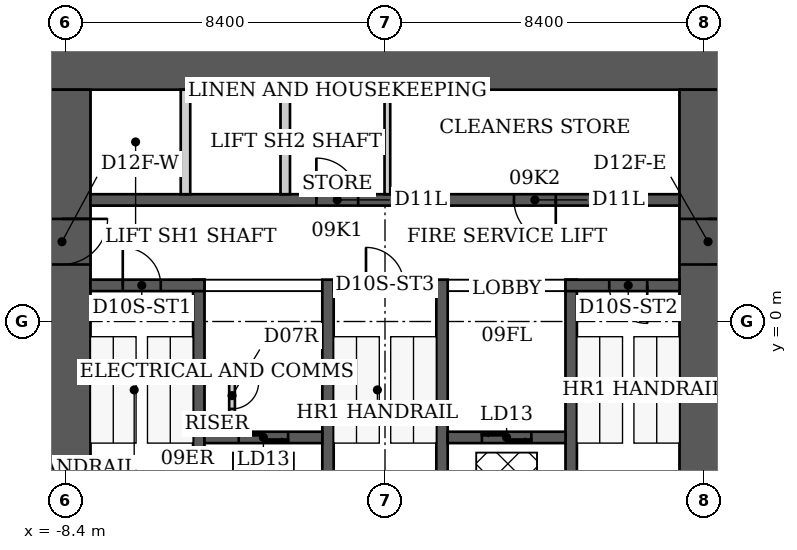
"""IFC4 building model, lengths in metres.
Left out: names, types, materials, properties, quantities, classifications, styles, units other than length and angle.
Written with IfcOpenShell. Run it as: python <this file> out.ifc"""

import sys

from ifc_helpers import new_model, si_unit, direction, frame, frame_2d, origin, place, context, subcontext, project, spatial, rectangle, extrude, element, fill, save


model = new_model("IFC4")
c1 = context("Model", 3, precision=1e-05, world=origin(), true_north=direction((0.0, 1.0)))
c2 = subcontext(c1, "Body", "Model", "MODEL_VIEW")
j1 = project(units=[si_unit("LENGTHUNIT", "METRE"), si_unit("PLANEANGLEUNIT", "RADIAN")], contexts=[c1])
p1 = place(None, origin())
s1 = spatial("IfcSite", under=j1, at=p1, CompositionType="ELEMENT")
p2 = place(p1, origin())
s2 = spatial("IfcBuilding", under=s1, at=p2, CompositionType="ELEMENT")
p3 = place(p2, frame((0.0, 0.0, 42.0)))
s3 = spatial("IfcBuildingStorey", under=s2, at=p3, CompositionType="ELEMENT", Elevation=42.0)
p4 = place(p3, frame((-9.25, 6.85, 0.0), z_axis=(0.0, 0.0, 1.0), x_axis=(1.0, 0.0, 0.0)))
e1 = element("IfcWall", 1, at=p4, inside=s3, PredefinedType="SHEAR", context=c2, shape_type="SweptSolid", body=[
    extrude(rectangle(XDim=18.5, YDim=1.5, at=frame_2d((9.25, 0.0))), origin(), (0.0, 0.0, 1.0), 3.8),
])
p5 = place(p3, frame((-8.5, -9.2, 0.0), z_axis=(0.0, 0.0, 1.0), x_axis=(0.0, 1.0, 0.0)))
e2 = element("IfcWall", 2, at=p5, inside=s3, PredefinedType="SHEAR", context=c2, shape_type="SweptSolid", body=[
    extrude(rectangle(XDim=15.3, YDim=1.5, at=frame_2d((7.65, 0.0))), origin(), (0.0, 0.0, 1.0), 3.8),
])
p6 = place(p5, frame((10.7, 0.0, 0.0)))
e3 = element("IfcOpeningElement", 3, at=p6, cuts=e2, PredefinedType="OPENING", context=c2, shape_type="SweptSolid", body=[
    extrude(rectangle(XDim=1.2, YDim=2.2, at=frame_2d((0.6, 1.1))), frame((0.0, 0.75, 0.0), z_axis=(0.0, -1.0, 0.0), x_axis=(1.0, 0.0, 0.0)), (0.0, 0.0, 1.0), 1.5),
])
p7 = place(p3, frame((8.5, -9.2, 0.0), z_axis=(0.0, 0.0, 1.0), x_axis=(0.0, 1.0, 0.0)))
e4 = element("IfcWall", 4, at=p7, inside=s3, PredefinedType="SHEAR", context=c2, shape_type="SweptSolid", body=[
    extrude(rectangle(XDim=15.3, YDim=1.5, at=frame_2d((7.65, 0.0))), origin(), (0.0, 0.0, 1.0), 3.8),
])
p8 = place(p7, frame((10.7, 0.0, 0.0)))
e5 = element("IfcOpeningElement", 5, at=p8, cuts=e4, PredefinedType="OPENING", context=c2, shape_type="SweptSolid", body=[
    extrude(rectangle(XDim=1.2, YDim=2.2, at=frame_2d((0.6, 1.1))), frame((0.0, 0.75, 0.0), z_axis=(0.0, -1.0, 0.0), x_axis=(1.0, 0.0, 0.0)), (0.0, 0.0, 1.0), 1.5),
])
for number, where, z_axis, x_axis in (
    (6, (-4.9, -6.1, 0.0), (0.0, 0.0, 1.0), (0.0, 1.0, 0.0)),
    (7, (-1.5, -6.1, 0.0), (0.0, 0.0, 1.0), (0.0, 1.0, 0.0)),
    (8, (1.5, -6.1, 0.0), (0.0, 0.0, 1.0), (0.0, 1.0, 0.0)),
    (9, (4.9, -6.1, 0.0), (0.0, 0.0, 1.0), (0.0, 1.0, 0.0)),
):
    element("IfcWall", number, at=place(p3, frame(where, z_axis=z_axis, x_axis=x_axis)), inside=s3, PredefinedType="SHEAR", context=c2, shape_type="SweptSolid", body=[
        extrude(rectangle(XDim=7.2, YDim=0.3, at=frame_2d((3.6, 0.0))), origin(), (0.0, 0.0, 1.0), 3.8),
    ])
p9 = place(p3, frame((-7.75, 0.95, 0.0), z_axis=(0.0, 0.0, 1.0), x_axis=(1.0, 0.0, 0.0)))
e10 = element("IfcWall", 10, at=p9, inside=s3, PredefinedType="SHEAR", context=c2, shape_type="SweptSolid", body=[
    extrude(rectangle(XDim=3.0, YDim=0.3, at=frame_2d((1.5, 0.0))), origin(), (0.0, 0.0, 1.0), 3.8),
])
p10 = place(p9, frame((0.85, 0.0, 0.0)))
e11 = element("IfcOpeningElement", 11, at=p10, cuts=e10, PredefinedType="OPENING", context=c2, shape_type="SweptSolid", body=[
    extrude(rectangle(XDim=1.0, YDim=2.2, at=frame_2d((0.5, 1.1))), frame((0.0, 0.15, 0.0), z_axis=(0.0, -1.0, 0.0), x_axis=(1.0, 0.0, 0.0)), (0.0, 0.0, 1.0), 0.3),
])
p11 = place(p3, frame((-1.35, 0.95, 0.0), z_axis=(0.0, 0.0, 1.0), x_axis=(1.0, 0.0, 0.0)))
e12 = element("IfcWall", 12, at=p11, inside=s3, PredefinedType="SHEAR", context=c2, shape_type="SweptSolid", body=[
    extrude(rectangle(XDim=2.7, YDim=0.3, at=frame_2d((1.35, 0.0))), origin(), (0.0, 0.0, 1.0), 3.8),
])
p12 = place(p11, frame((0.85, 0.0, 0.0)))
e13 = element("IfcOpeningElement", 13, at=p12, cuts=e12, PredefinedType="OPENING", context=c2, shape_type="SweptSolid", body=[
    extrude(rectangle(XDim=1.0, YDim=2.2, at=frame_2d((0.5, 1.1))), frame((0.0, 0.15, 0.0), z_axis=(0.0, -1.0, 0.0), x_axis=(1.0, 0.0, 0.0)), (0.0, 0.0, 1.0), 0.3),
])
p13 = place(p3, frame((4.75, 0.95, 0.0), z_axis=(0.0, 0.0, 1.0), x_axis=(1.0, 0.0, 0.0)))
e14 = element("IfcWall", 14, at=p13, inside=s3, PredefinedType="SHEAR", context=c2, shape_type="SweptSolid", body=[
    extrude(rectangle(XDim=3.0, YDim=0.3, at=frame_2d((1.5, 0.0))), origin(), (0.0, 0.0, 1.0), 3.8),
])
p14 = place(p13, frame((1.15, 0.0, 0.0)))
e15 = element("IfcOpeningElement", 15, at=p14, cuts=e14, PredefinedType="OPENING", context=c2, shape_type="SweptSolid", body=[
    extrude(rectangle(XDim=1.0, YDim=2.2, at=frame_2d((0.5, 1.1))), frame((0.0, 0.15, 0.0), z_axis=(0.0, -1.0, 0.0), x_axis=(1.0, 0.0, 0.0)), (0.0, 0.0, 1.0), 0.3),
])
p15 = place(p3, frame((-4.75, -3.05, 0.0), z_axis=(0.0, 0.0, 1.0), x_axis=(1.0, 0.0, 0.0)))
e16 = element("IfcWall", 16, at=p15, inside=s3, PredefinedType="SHEAR", context=c2, shape_type="SweptSolid", body=[
    extrude(rectangle(XDim=3.1, YDim=0.3, at=frame_2d((1.55, 0.0))), origin(), (0.0, 0.0, 1.0), 3.8),
])
p16 = place(p15, frame((0.9, 0.0, 0.0)))
e17 = element("IfcOpeningElement", 17, at=p16, cuts=e16, PredefinedType="OPENING", context=c2, shape_type="SweptSolid", body=[
    extrude(rectangle(XDim=1.3, YDim=2.1, at=frame_2d((0.65, 1.05))), frame((0.0, 0.15, 0.0), z_axis=(0.0, -1.0, 0.0), x_axis=(1.0, 0.0, 0.0)), (0.0, 0.0, 1.0), 0.3),
])
p17 = place(p3, frame((1.65, -3.05, 0.0), z_axis=(0.0, 0.0, 1.0), x_axis=(1.0, 0.0, 0.0)))
e18 = element("IfcWall", 18, at=p17, inside=s3, PredefinedType="SHEAR", context=c2, shape_type="SweptSolid", body=[
    extrude(rectangle(XDim=3.1, YDim=0.3, at=frame_2d((1.55, 0.0))), origin(), (0.0, 0.0, 1.0), 3.8),
])
p18 = place(p17, frame((0.9, 0.0, 0.0)))
e19 = element("IfcOpeningElement", 19, at=p18, cuts=e18, PredefinedType="OPENING", context=c2, shape_type="SweptSolid", body=[
    extrude(rectangle(XDim=1.3, YDim=2.1, at=frame_2d((0.65, 1.05))), frame((0.0, 0.15, 0.0), z_axis=(0.0, -1.0, 0.0), x_axis=(1.0, 0.0, 0.0)), (0.0, 0.0, 1.0), 0.3),
])
p19 = place(p3, frame((-7.75, 3.2, 0.0), z_axis=(0.0, 0.0, 1.0), x_axis=(1.0, 0.0, 0.0)))
e20 = element("IfcWall", 20, at=p19, inside=s3, PredefinedType="SHEAR", context=c2, shape_type="SweptSolid", body=[
    extrude(rectangle(XDim=15.5, YDim=0.3, at=frame_2d((7.75, 0.0))), origin(), (0.0, 0.0, 1.0), 3.8),
])
p20 = place(p19, frame((5.944, 0.0, 0.0)))
e21 = element("IfcOpeningElement", 21, at=p20, cuts=e20, PredefinedType="OPENING", context=c2, shape_type="SweptSolid", body=[
    extrude(rectangle(XDim=1.1, YDim=2.2, at=frame_2d((0.55, 1.1))), frame((0.0, 0.15, 0.0), z_axis=(0.0, -1.0, 0.0), x_axis=(1.0, 0.0, 0.0)), (0.0, 0.0, 1.0), 0.3),
])
p21 = place(p19, frame((11.144, 0.0, 0.0)))
e22 = element("IfcOpeningElement", 22, at=p21, cuts=e20, PredefinedType="OPENING", context=c2, shape_type="SweptSolid", body=[
    extrude(rectangle(XDim=1.1, YDim=2.2, at=frame_2d((0.55, 1.1))), frame((0.0, 0.15, 0.0), z_axis=(0.0, -1.0, 0.0), x_axis=(1.0, 0.0, 0.0)), (0.0, 0.0, 1.0), 0.3),
])
for number, where, z_axis, x_axis in (
    (23, (-5.25, 3.35, 0.0), (0.0, 0.0, 1.0), (0.0, 1.0, 0.0)),
    (24, (-2.625, 3.35, 0.0), (0.0, 0.0, 1.0), (0.0, 1.0, 0.0)),
):
    element("IfcWall", number, at=place(p3, frame(where, z_axis=z_axis, x_axis=x_axis)), inside=s3, PredefinedType="PARTITIONING", context=c2, shape_type="SweptSolid", body=[
        extrude(rectangle(XDim=2.75, YDim=0.25, at=frame_2d((1.375, 0.0))), origin(), (0.0, 0.0, 1.0), 3.8),
    ])
p22 = place(p3, frame((-4.025, -2.9, 0.0), z_axis=(0.0, 0.0, 1.0), x_axis=(0.0, 1.0, 0.0)))
e25 = element("IfcWall", 25, at=p22, inside=s3, PredefinedType="PARTITIONING", context=c2, shape_type="SweptSolid", body=[
    extrude(rectangle(XDim=1.775, YDim=0.15, at=frame_2d((0.887, 0.0))), origin(), (0.0, 0.0, 1.0), 3.64),
])
p23 = place(p22, frame((0.6, 0.0, 0.0)))
e26 = element("IfcOpeningElement", 26, at=p23, cuts=e25, PredefinedType="OPENING", context=c2, shape_type="SweptSolid", body=[
    extrude(rectangle(XDim=0.7, YDim=2.1, at=frame_2d((0.35, 1.05))), frame((0.0, 0.075, 0.0), z_axis=(0.0, -1.0, 0.0), x_axis=(1.0, 0.0, 0.0)), (0.0, 0.0, 1.0), 0.15),
])
p24 = place(p3, frame((-4.75, -1.2, 0.0), z_axis=(0.0, 0.0, 1.0), x_axis=(1.0, 0.0, 0.0)))
e27 = element("IfcWall", 27, at=p24, inside=s3, PredefinedType="PARTITIONING", context=c2, shape_type="SweptSolid", body=[
    extrude(rectangle(XDim=0.8, YDim=0.15, at=frame_2d((0.4, 0.0))), origin(), (0.0, 0.0, 1.0), 3.64),
])
p25 = place(p3, frame((0.062, 3.35, 0.0), z_axis=(0.0, 0.0, 1.0), x_axis=(0.0, 1.0, 0.0)))
e28 = element("IfcWall", 28, at=p25, inside=s3, PredefinedType="PARTITIONING", context=c2, shape_type="SweptSolid", body=[
    extrude(rectangle(XDim=2.75, YDim=0.15, at=frame_2d((1.375, 0.0))), origin(), (0.0, 0.0, 1.0), 3.64),
])
p26 = place(p10, origin())
e29 = element("IfcDoor", 29, at=p26, inside=s3, OperationType="SINGLE_SWING_LEFT", PredefinedType="DOOR", context=c2, shape_type="SweptSolid", body=[
    extrude(rectangle(XDim=1.0, YDim=2.2, at=frame_2d((0.5, 1.1))), frame((0.0, 0.025, 0.0), z_axis=(0.0, -1.0, 0.0), x_axis=(1.0, 0.0, 0.0)), (0.0, 0.0, 1.0), 0.05),
])
fill(e11, e29)
p27 = place(p12, origin())
e30 = element("IfcDoor", 30, at=p27, inside=s3, OperationType="SINGLE_SWING_LEFT", PredefinedType="DOOR", context=c2, shape_type="SweptSolid", body=[
    extrude(rectangle(XDim=1.0, YDim=2.2, at=frame_2d((0.5, 1.1))), frame((0.0, 0.025, 0.0), z_axis=(0.0, -1.0, 0.0), x_axis=(1.0, 0.0, 0.0)), (0.0, 0.0, 1.0), 0.05),
])
fill(e13, e30)
p28 = place(p14, origin())
e31 = element("IfcDoor", 31, at=p28, inside=s3, OperationType="SINGLE_SWING_RIGHT", PredefinedType="DOOR", context=c2, shape_type="SweptSolid", body=[
    extrude(rectangle(XDim=1.0, YDim=2.2, at=frame_2d((0.5, 1.1))), frame((0.0, 0.025, 0.0), z_axis=(0.0, -1.0, 0.0), x_axis=(1.0, 0.0, 0.0)), (0.0, 0.0, 1.0), 0.05),
])
fill(e15, e31)
p29 = place(p6, origin())
e32 = element("IfcDoor", 32, at=p29, inside=s3, OperationType="SINGLE_SWING_RIGHT", PredefinedType="DOOR", context=c2, shape_type="SweptSolid", body=[
    extrude(rectangle(XDim=1.2, YDim=2.2, at=frame_2d((0.6, 1.1))), frame((0.0, 0.025, 0.0), z_axis=(0.0, -1.0, 0.0), x_axis=(1.0, 0.0, 0.0)), (0.0, 0.0, 1.0), 0.05),
])
fill(e3, e32)
p30 = place(p8, origin())
e33 = element("IfcDoor", 33, at=p30, inside=s3, OperationType="SINGLE_SWING_RIGHT", PredefinedType="DOOR", context=c2, shape_type="SweptSolid", body=[
    extrude(rectangle(XDim=1.2, YDim=2.2, at=frame_2d((0.6, 1.1))), frame((0.0, 0.025, 0.0), z_axis=(0.0, -1.0, 0.0), x_axis=(1.0, 0.0, 0.0)), (0.0, 0.0, 1.0), 0.05),
])
fill(e5, e33)
p31 = place(p23, origin())
e34 = element("IfcDoor", 34, at=p31, inside=s3, OperationType="SINGLE_SWING_RIGHT", PredefinedType="DOOR", context=c2, shape_type="SweptSolid", body=[
    extrude(rectangle(XDim=0.7, YDim=2.1, at=frame_2d((0.35, 1.05))), frame((0.0, 0.025, 0.0), z_axis=(0.0, -1.0, 0.0), x_axis=(1.0, 0.0, 0.0)), (0.0, 0.0, 1.0), 0.05),
])
fill(e26, e34)
p32 = place(p20, origin())
e35 = element("IfcDoor", 35, at=p32, inside=s3, OperationType="SINGLE_SWING_LEFT", PredefinedType="DOOR", context=c2, shape_type="SweptSolid", body=[
    extrude(rectangle(XDim=1.1, YDim=2.2, at=frame_2d((0.55, 1.1))), frame((0.0, 0.025, 0.0), z_axis=(0.0, -1.0, 0.0), x_axis=(1.0, 0.0, 0.0)), (0.0, 0.0, 1.0), 0.05),
])
fill(e21, e35)
p33 = place(p21, origin())
e36 = element("IfcDoor", 36, at=p33, inside=s3, OperationType="SINGLE_SWING_RIGHT", PredefinedType="DOOR", context=c2, shape_type="SweptSolid", body=[
    extrude(rectangle(XDim=1.1, YDim=2.2, at=frame_2d((0.55, 1.1))), frame((0.0, 0.025, 0.0), z_axis=(0.0, -1.0, 0.0), x_axis=(1.0, 0.0, 0.0)), (0.0, 0.0, 1.0), 0.05),
])
fill(e22, e36)
p34 = place(p16, origin())
e37 = element("IfcDoor", 37, at=p34, inside=s3, OperationType="DOUBLE_DOOR_SLIDING", PredefinedType="DOOR", context=c2, shape_type="SweptSolid", body=[
    extrude(rectangle(XDim=1.3, YDim=2.1, at=frame_2d((0.65, 1.05))), frame((0.0, 0.025, 0.0), z_axis=(0.0, -1.0, 0.0), x_axis=(1.0, 0.0, 0.0)), (0.0, 0.0, 1.0), 0.05),
])
fill(e17, e37)
p35 = place(p18, origin())
e38 = element("IfcDoor", 38, at=p35, inside=s3, OperationType="DOUBLE_DOOR_SLIDING", PredefinedType="DOOR", context=c2, shape_type="SweptSolid", body=[
    extrude(rectangle(XDim=1.3, YDim=2.1, at=frame_2d((0.65, 1.05))), frame((0.0, 0.025, 0.0), z_axis=(0.0, -1.0, 0.0), x_axis=(1.0, 0.0, 0.0)), (0.0, 0.0, 1.0), 0.05),
])
fill(e19, e38)
save(model, sys.argv[1])
